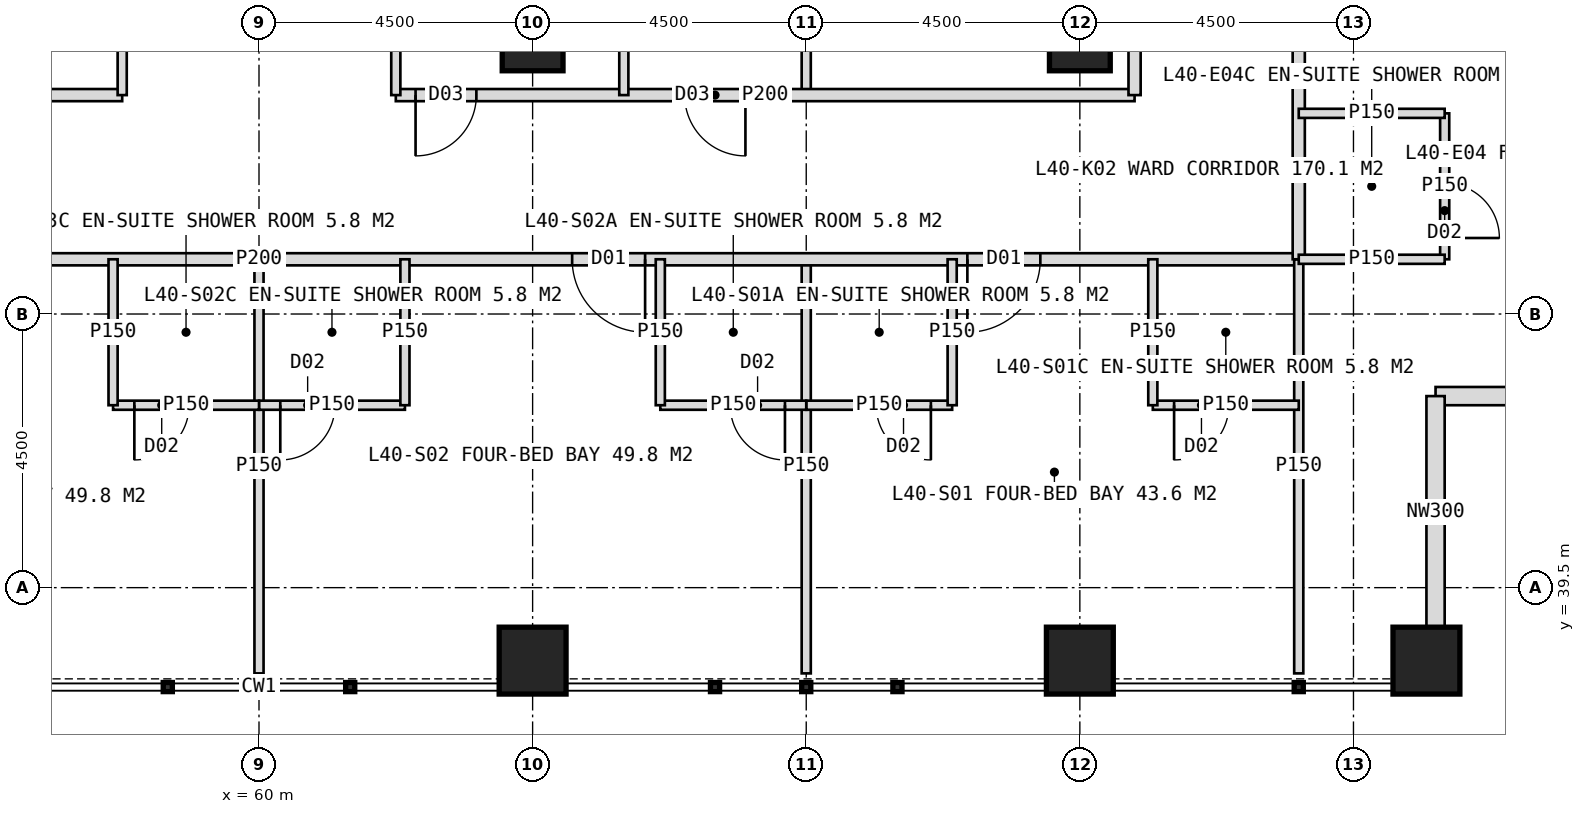
"""IFC4 building model, lengths in metres.
Left out: names, types, materials, properties, quantities, classifications, styles, units other than length and angle.
Written with IfcOpenShell. Run it as: python <this file> out.ifc"""

import sys

from ifc_helpers import new_model, si_unit, direction, frame, frame_2d, origin, origin_2d, place, context, subcontext, project, spatial, rectangle, hollow_rectangle, extrude, element, fill, save


model = new_model("IFC4")
c1 = context("Model", 3, precision=1e-05, world=origin(), true_north=direction((0.0, 1.0)))
c2 = subcontext(c1, "Body", "Model", "MODEL_VIEW")
j1 = project(units=[si_unit("LENGTHUNIT", "METRE"), si_unit("PLANEANGLEUNIT", "RADIAN")], contexts=[c1])
p1 = place(None, origin())
s1 = spatial("IfcSite", under=j1, at=p1, CompositionType="ELEMENT")
p2 = place(p1, origin())
s2 = spatial("IfcBuilding", under=s1, at=p2, CompositionType="ELEMENT")
p3 = place(p2, frame((0.0, 0.0, 168.0)))
s3 = spatial("IfcBuildingStorey", under=s2, at=p3, CompositionType="ELEMENT", Elevation=168.0)
for number, where, z_axis, x_axis in (
    (1, (73.5, 48.5, 0.0), (0.0, 0.0, 1.0), (1.0, 0.0, 0.0)),
    (2, (64.5, 48.5, 0.0), (0.0, 0.0, 1.0), (1.0, 0.0, 0.0)),
):
    element("IfcColumn", number, at=place(p3, frame(where, z_axis=z_axis, x_axis=x_axis)), inside=s3, PredefinedType="COLUMN", context=c2, shape_type="SweptSolid", body=[
        extrude(hollow_rectangle(XDim=1.0, YDim=1.0, WallThickness=0.1, at=origin_2d()), origin(), (0.0, 0.0, 1.0), 4.0),
    ])
for number, where, z_axis, x_axis in (
    (3, (64.5, 38.3, 0.0), (0.0, 0.0, 1.0), (1.0, 0.0, 0.0)),
    (4, (73.5, 38.3, 0.0), (0.0, 0.0, 1.0), (1.0, 0.0, 0.0)),
    (5, (79.2, 38.3, 0.0), (0.0, 0.0, 1.0), (1.0, 0.0, 0.0)),
):
    element("IfcColumn", number, at=place(p3, frame(where, z_axis=z_axis, x_axis=x_axis)), inside=s3, PredefinedType="COLUMN", context=c2, shape_type="SweptSolid", body=[
        extrude(hollow_rectangle(XDim=1.1, YDim=1.1, WallThickness=0.1, at=origin_2d()), origin(), (0.0, 0.0, 1.0), 4.0),
    ])
for number, where, z_axis, x_axis in (
    (6, (83.15, 42.65, 0.0), (0.0, 0.0, 1.0), (-1.0, 0.0, 0.0)),
    (7, (79.35, 42.65, 0.0), (0.0, 0.0, 1.0), (0.0, -1.0, 0.0)),
):
    element("IfcWall", number, at=place(p3, frame(where, z_axis=z_axis, x_axis=x_axis)), inside=s3, PredefinedType="ELEMENTEDWALL", context=c2, shape_type="SweptSolid", body=[
        extrude(rectangle(XDim=3.8, YDim=0.3, at=frame_2d((1.9, 0.0))), origin(), (0.0, 0.0, 1.0), 4.0),
    ])
p4 = place(p3, frame((69.0, 44.9, 0.0), z_axis=(0.0, 0.0, 1.0), x_axis=(0.0, -1.0, 0.0)))
e8 = element("IfcWall", 8, at=p4, inside=s3, PredefinedType="PARTITIONING", context=c2, shape_type="SweptSolid", body=[
    extrude(rectangle(XDim=6.81, YDim=0.15, at=frame_2d((3.405, 0.0))), origin(), (0.0, 0.0, 1.0), 3.75),
])
p5 = place(p3, frame((60.0, 44.9, 0.0), z_axis=(0.0, 0.0, 1.0), x_axis=(0.0, -1.0, 0.0)))
e9 = element("IfcWall", 9, at=p5, inside=s3, PredefinedType="PARTITIONING", context=c2, shape_type="SweptSolid", body=[
    extrude(rectangle(XDim=6.81, YDim=0.15, at=frame_2d((3.405, 0.0))), origin(), (0.0, 0.0, 1.0), 2.95),
])
p6 = place(p3, frame((77.1, 44.9, 0.0), z_axis=(0.0, 0.0, 1.0), x_axis=(-1.0, 0.0, 0.0)))
e10 = element("IfcWall", 10, at=p6, inside=s3, PredefinedType="PARTITIONING", context=c2, shape_type="SweptSolid", body=[
    extrude(rectangle(XDim=34.2, YDim=0.2, at=frame_2d((17.1, 0.0))), origin(), (0.0, 0.0, 1.0), 3.75),
])
p7 = place(p6, frame((4.25, 0.0, 0.0)))
e11 = element("IfcOpeningElement", 11, at=p7, cuts=e10, PredefinedType="OPENING", context=c2, shape_type="SweptSolid", body=[
    extrude(rectangle(XDim=1.2, YDim=2.2, at=frame_2d((0.6, 1.1))), frame((0.0, 0.11, 0.0), z_axis=(0.0, -1.0, 0.0), x_axis=(1.0, 0.0, 0.0)), (0.0, 0.0, 1.0), 0.22),
])
p8 = place(p6, frame((10.75, 0.0, 0.0)))
e12 = element("IfcOpeningElement", 12, at=p8, cuts=e10, PredefinedType="OPENING", context=c2, shape_type="SweptSolid", body=[
    extrude(rectangle(XDim=1.2, YDim=2.2, at=frame_2d((0.6, 1.1))), frame((0.0, 0.11, 0.0), z_axis=(0.0, -1.0, 0.0), x_axis=(1.0, 0.0, 0.0)), (0.0, 0.0, 1.0), 0.22),
])
p9 = place(p6, frame((22.25, 0.0, 0.0)))
e13 = element("IfcOpeningElement", 13, at=p9, cuts=e10, PredefinedType="OPENING", context=c2, shape_type="SweptSolid", body=[
    extrude(rectangle(XDim=1.2, YDim=2.2, at=frame_2d((0.6, 1.1))), frame((0.0, 0.11, 0.0), z_axis=(0.0, -1.0, 0.0), x_axis=(1.0, 0.0, 0.0)), (0.0, 0.0, 1.0), 0.22),
])
p10 = place(p6, frame((28.75, 0.0, 0.0)))
e14 = element("IfcOpeningElement", 14, at=p10, cuts=e10, PredefinedType="OPENING", context=c2, shape_type="SweptSolid", body=[
    extrude(rectangle(XDim=1.2, YDim=2.2, at=frame_2d((0.6, 1.1))), frame((0.0, 0.11, 0.0), z_axis=(0.0, -1.0, 0.0), x_axis=(1.0, 0.0, 0.0)), (0.0, 0.0, 1.0), 0.22),
])
p11 = place(p3, frame((77.1, 44.9, 0.0), z_axis=(0.0, 0.0, 1.0), x_axis=(0.0, -1.0, 0.0)))
e15 = element("IfcWall", 15, at=p11, inside=s3, PredefinedType="PARTITIONING", context=c2, shape_type="SweptSolid", body=[
    extrude(rectangle(XDim=6.81, YDim=0.15, at=frame_2d((3.405, 0.0))), origin(), (0.0, 0.0, 1.0), 3.75),
])
p12 = place(p3, frame((71.4, 42.5, 0.0), z_axis=(0.0, 0.0, 1.0), x_axis=(-1.0, 0.0, 0.0)))
e16 = element("IfcWall", 16, at=p12, inside=s3, PredefinedType="PARTITIONING", context=c2, shape_type="SweptSolid", body=[
    extrude(rectangle(XDim=2.4, YDim=0.15, at=frame_2d((1.2, 0.0))), origin(), (0.0, 0.0, 1.0), 3.75),
])
p13 = place(p12, frame((0.35, 0.0, 0.0)))
e17 = element("IfcOpeningElement", 17, at=p13, cuts=e16, PredefinedType="OPENING", context=c2, shape_type="SweptSolid", body=[
    extrude(rectangle(XDim=0.9, YDim=2.1, at=frame_2d((0.45, 1.05))), frame((0.0, 0.085, 0.0), z_axis=(0.0, -1.0, 0.0), x_axis=(1.0, 0.0, 0.0)), (0.0, 0.0, 1.0), 0.17),
])
p14 = place(p3, frame((71.4, 44.9, 0.0), z_axis=(0.0, 0.0, 1.0), x_axis=(0.0, -1.0, 0.0)))
e18 = element("IfcWall", 18, at=p14, inside=s3, PredefinedType="PARTITIONING", context=c2, shape_type="SweptSolid", body=[
    extrude(rectangle(XDim=2.4, YDim=0.15, at=frame_2d((1.2, 0.0))), origin(), (0.0, 0.0, 1.0), 3.75),
])
p15 = place(p3, frame((77.1, 42.5, 0.0), z_axis=(0.0, 0.0, 1.0), x_axis=(-1.0, 0.0, 0.0)))
e19 = element("IfcWall", 19, at=p15, inside=s3, PredefinedType="PARTITIONING", context=c2, shape_type="SweptSolid", body=[
    extrude(rectangle(XDim=2.4, YDim=0.15, at=frame_2d((1.2, 0.0))), origin(), (0.0, 0.0, 1.0), 3.75),
])
p16 = place(p15, frame((1.15, 0.0, 0.0)))
e20 = element("IfcOpeningElement", 20, at=p16, cuts=e19, PredefinedType="OPENING", context=c2, shape_type="SweptSolid", body=[
    extrude(rectangle(XDim=0.9, YDim=2.1, at=frame_2d((0.45, 1.05))), frame((0.0, 0.085, 0.0), z_axis=(0.0, -1.0, 0.0), x_axis=(1.0, 0.0, 0.0)), (0.0, 0.0, 1.0), 0.17),
])
p17 = place(p3, frame((74.7, 44.9, 0.0), z_axis=(0.0, 0.0, 1.0), x_axis=(0.0, -1.0, 0.0)))
e21 = element("IfcWall", 21, at=p17, inside=s3, PredefinedType="PARTITIONING", context=c2, shape_type="SweptSolid", body=[
    extrude(rectangle(XDim=2.4, YDim=0.15, at=frame_2d((1.2, 0.0))), origin(), (0.0, 0.0, 1.0), 3.75),
])
p18 = place(p3, frame((69.0, 42.5, 0.0), z_axis=(0.0, 0.0, 1.0), x_axis=(-1.0, 0.0, 0.0)))
e22 = element("IfcWall", 22, at=p18, inside=s3, PredefinedType="PARTITIONING", context=c2, shape_type="SweptSolid", body=[
    extrude(rectangle(XDim=2.4, YDim=0.15, at=frame_2d((1.2, 0.0))), origin(), (0.0, 0.0, 1.0), 3.75),
])
p19 = place(p18, frame((0.35, 0.0, 0.0)))
e23 = element("IfcOpeningElement", 23, at=p19, cuts=e22, PredefinedType="OPENING", context=c2, shape_type="SweptSolid", body=[
    extrude(rectangle(XDim=0.9, YDim=2.1, at=frame_2d((0.45, 1.05))), frame((0.0, 0.085, 0.0), z_axis=(0.0, -1.0, 0.0), x_axis=(1.0, 0.0, 0.0)), (0.0, 0.0, 1.0), 0.17),
])
p20 = place(p3, frame((66.6, 44.9, 0.0), z_axis=(0.0, 0.0, 1.0), x_axis=(0.0, -1.0, 0.0)))
e24 = element("IfcWall", 24, at=p20, inside=s3, PredefinedType="PARTITIONING", context=c2, shape_type="SweptSolid", body=[
    extrude(rectangle(XDim=2.4, YDim=0.15, at=frame_2d((1.2, 0.0))), origin(), (0.0, 0.0, 1.0), 3.75),
])
p21 = place(p3, frame((62.4, 42.5, 0.0), z_axis=(0.0, 0.0, 1.0), x_axis=(-1.0, 0.0, 0.0)))
e25 = element("IfcWall", 25, at=p21, inside=s3, PredefinedType="PARTITIONING", context=c2, shape_type="SweptSolid", body=[
    extrude(rectangle(XDim=2.4, YDim=0.15, at=frame_2d((1.2, 0.0))), origin(), (0.0, 0.0, 1.0), 3.75),
])
p22 = place(p21, frame((1.15, 0.0, 0.0)))
e26 = element("IfcOpeningElement", 26, at=p22, cuts=e25, PredefinedType="OPENING", context=c2, shape_type="SweptSolid", body=[
    extrude(rectangle(XDim=0.9, YDim=2.1, at=frame_2d((0.45, 1.05))), frame((0.0, 0.085, 0.0), z_axis=(0.0, -1.0, 0.0), x_axis=(1.0, 0.0, 0.0)), (0.0, 0.0, 1.0), 0.17),
])
p23 = place(p3, frame((62.4, 44.9, 0.0), z_axis=(0.0, 0.0, 1.0), x_axis=(0.0, -1.0, 0.0)))
e27 = element("IfcWall", 27, at=p23, inside=s3, PredefinedType="PARTITIONING", context=c2, shape_type="SweptSolid", body=[
    extrude(rectangle(XDim=2.4, YDim=0.15, at=frame_2d((1.2, 0.0))), origin(), (0.0, 0.0, 1.0), 3.75),
])
p24 = place(p3, frame((60.0, 42.5, 0.0), z_axis=(0.0, 0.0, 1.0), x_axis=(-1.0, 0.0, 0.0)))
e28 = element("IfcWall", 28, at=p24, inside=s3, PredefinedType="PARTITIONING", context=c2, shape_type="SweptSolid", body=[
    extrude(rectangle(XDim=2.4, YDim=0.15, at=frame_2d((1.2, 0.0))), origin(), (0.0, 0.0, 1.0), 3.75),
])
p25 = place(p24, frame((1.15, 0.0, 0.0)))
e29 = element("IfcOpeningElement", 29, at=p25, cuts=e28, PredefinedType="OPENING", context=c2, shape_type="SweptSolid", body=[
    extrude(rectangle(XDim=0.9, YDim=2.1, at=frame_2d((0.45, 1.05))), frame((0.0, 0.085, 0.0), z_axis=(0.0, -1.0, 0.0), x_axis=(1.0, 0.0, 0.0)), (0.0, 0.0, 1.0), 0.17),
])
p26 = place(p3, frame((57.6, 44.9, 0.0), z_axis=(0.0, 0.0, 1.0), x_axis=(0.0, -1.0, 0.0)))
e30 = element("IfcWall", 30, at=p26, inside=s3, PredefinedType="PARTITIONING", context=c2, shape_type="SweptSolid", body=[
    extrude(rectangle(XDim=2.4, YDim=0.15, at=frame_2d((1.2, 0.0))), origin(), (0.0, 0.0, 1.0), 3.75),
])
p27 = place(p3, frame((69.0, 53.0, 0.0), z_axis=(0.0, 0.0, 1.0), x_axis=(0.0, -1.0, 0.0)))
e31 = element("IfcWall", 31, at=p27, inside=s3, PredefinedType="PARTITIONING", context=c2, shape_type="SweptSolid", body=[
    extrude(rectangle(XDim=5.4, YDim=0.15, at=frame_2d((2.7, 0.0))), origin(), (0.0, 0.0, 1.0), 3.75),
])
p28 = place(p3, frame((74.4, 47.6, 0.0), z_axis=(0.0, 0.0, 1.0), x_axis=(-1.0, 0.0, 0.0)))
e32 = element("IfcWall", 32, at=p28, inside=s3, PredefinedType="PARTITIONING", context=c2, shape_type="SweptSolid", body=[
    extrude(rectangle(XDim=12.15, YDim=0.2, at=frame_2d((6.075, 0.0))), origin(), (0.0, 0.0, 1.0), 3.75),
])
p29 = place(p28, frame((6.4, 0.0, 0.0)))
e33 = element("IfcOpeningElement", 33, at=p29, cuts=e32, PredefinedType="OPENING", context=c2, shape_type="SweptSolid", body=[
    extrude(rectangle(XDim=1.0, YDim=2.1, at=frame_2d((0.5, 1.05))), frame((0.0, 0.11, 0.0), z_axis=(0.0, -1.0, 0.0), x_axis=(1.0, 0.0, 0.0)), (0.0, 0.0, 1.0), 0.22),
])
p30 = place(p28, frame((10.825, 0.0, 0.0)))
e34 = element("IfcOpeningElement", 34, at=p30, cuts=e32, PredefinedType="OPENING", context=c2, shape_type="SweptSolid", body=[
    extrude(rectangle(XDim=1.0, YDim=2.1, at=frame_2d((0.5, 1.05))), frame((0.0, 0.11, 0.0), z_axis=(0.0, -1.0, 0.0), x_axis=(1.0, 0.0, 0.0)), (0.0, 0.0, 1.0), 0.22),
])
p31 = place(p3, frame((57.75, 47.6, 0.0), z_axis=(0.0, 0.0, 1.0), x_axis=(-1.0, 0.0, 0.0)))
e35 = element("IfcWall", 35, at=p31, inside=s3, PredefinedType="PARTITIONING", context=c2, shape_type="SweptSolid", body=[
    extrude(rectangle(XDim=12.15, YDim=0.2, at=frame_2d((6.075, 0.0))), origin(), (0.0, 0.0, 1.0), 3.75),
])
p32 = place(p31, frame((4.3, 0.0, 0.0)))
e36 = element("IfcOpeningElement", 36, at=p32, cuts=e35, PredefinedType="OPENING", context=c2, shape_type="SweptSolid", body=[
    extrude(rectangle(XDim=1.0, YDim=2.1, at=frame_2d((0.5, 1.05))), frame((0.0, 0.11, 0.0), z_axis=(0.0, -1.0, 0.0), x_axis=(1.0, 0.0, 0.0)), (0.0, 0.0, 1.0), 0.22),
])
p33 = place(p31, frame((8.95, 0.0, 0.0)))
e37 = element("IfcOpeningElement", 37, at=p33, cuts=e35, PredefinedType="OPENING", context=c2, shape_type="SweptSolid", body=[
    extrude(rectangle(XDim=1.0, YDim=2.1, at=frame_2d((0.5, 1.05))), frame((0.0, 0.11, 0.0), z_axis=(0.0, -1.0, 0.0), x_axis=(1.0, 0.0, 0.0)), (0.0, 0.0, 1.0), 0.22),
])
for number, where, z_axis, x_axis in (
    (38, (62.25, 53.0, 0.0), (0.0, 0.0, 1.0), (0.0, -1.0, 0.0)),
    (39, (57.75, 53.0, 0.0), (0.0, 0.0, 1.0), (0.0, -1.0, 0.0)),
    (40, (66.0, 53.0, 0.0), (0.0, 0.0, 1.0), (0.0, -1.0, 0.0)),
):
    element("IfcWall", number, at=place(p3, frame(where, z_axis=z_axis, x_axis=x_axis)), inside=s3, PredefinedType="PARTITIONING", context=c2, shape_type="SweptSolid", body=[
        extrude(rectangle(XDim=5.4, YDim=0.15, at=frame_2d((2.7, 0.0))), origin(), (0.0, 0.0, 1.0), 3.75),
    ])
p34 = place(p3, frame((77.1, 79.1, 0.0), z_axis=(0.0, 0.0, 1.0), x_axis=(0.0, -1.0, 0.0)))
e41 = element("IfcWall", 41, at=p34, inside=s3, PredefinedType="PARTITIONING", context=c2, shape_type="SweptSolid", body=[
    extrude(rectangle(XDim=34.2, YDim=0.2, at=frame_2d((17.1, 0.0))), origin(), (0.0, 0.0, 1.0), 3.75),
])
p35 = place(p34, frame((3.65, 0.0, 0.0)))
e42 = element("IfcOpeningElement", 42, at=p35, cuts=e41, PredefinedType="OPENING", context=c2, shape_type="SweptSolid", body=[
    extrude(rectangle(XDim=1.2, YDim=2.2, at=frame_2d((0.6, 1.1))), frame((0.0, 0.11, 0.0), z_axis=(0.0, -1.0, 0.0), x_axis=(1.0, 0.0, 0.0)), (0.0, 0.0, 1.0), 0.22),
])
p36 = place(p34, frame((10.75, 0.0, 0.0)))
e43 = element("IfcOpeningElement", 43, at=p36, cuts=e41, PredefinedType="OPENING", context=c2, shape_type="SweptSolid", body=[
    extrude(rectangle(XDim=1.2, YDim=2.2, at=frame_2d((0.6, 1.1))), frame((0.0, 0.11, 0.0), z_axis=(0.0, -1.0, 0.0), x_axis=(1.0, 0.0, 0.0)), (0.0, 0.0, 1.0), 0.22),
])
p37 = place(p34, frame((22.25, 0.0, 0.0)))
e44 = element("IfcOpeningElement", 44, at=p37, cuts=e41, PredefinedType="OPENING", context=c2, shape_type="SweptSolid", body=[
    extrude(rectangle(XDim=1.2, YDim=2.2, at=frame_2d((0.6, 1.1))), frame((0.0, 0.11, 0.0), z_axis=(0.0, -1.0, 0.0), x_axis=(1.0, 0.0, 0.0)), (0.0, 0.0, 1.0), 0.22),
])
p38 = place(p34, frame((28.75, 0.0, 0.0)))
e45 = element("IfcOpeningElement", 45, at=p38, cuts=e41, PredefinedType="OPENING", context=c2, shape_type="SweptSolid", body=[
    extrude(rectangle(XDim=1.2, YDim=2.2, at=frame_2d((0.6, 1.1))), frame((0.0, 0.11, 0.0), z_axis=(0.0, -1.0, 0.0), x_axis=(1.0, 0.0, 0.0)), (0.0, 0.0, 1.0), 0.22),
])
p39 = place(p3, frame((79.5, 47.3, 0.0), z_axis=(0.0, 0.0, 1.0), x_axis=(0.0, -1.0, 0.0)))
e46 = element("IfcWall", 46, at=p39, inside=s3, PredefinedType="PARTITIONING", context=c2, shape_type="SweptSolid", body=[
    extrude(rectangle(XDim=2.4, YDim=0.15, at=frame_2d((1.2, 0.0))), origin(), (0.0, 0.0, 1.0), 3.75),
])
p40 = place(p39, frame((1.15, 0.0, 0.0)))
e47 = element("IfcOpeningElement", 47, at=p40, cuts=e46, PredefinedType="OPENING", context=c2, shape_type="SweptSolid", body=[
    extrude(rectangle(XDim=0.9, YDim=2.1, at=frame_2d((0.45, 1.05))), frame((0.0, 0.085, 0.0), z_axis=(0.0, -1.0, 0.0), x_axis=(1.0, 0.0, 0.0)), (0.0, 0.0, 1.0), 0.17),
])
for number, where, z_axis, x_axis in (
    (48, (77.1, 47.3, 0.0), (0.0, 0.0, 1.0), (1.0, 0.0, 0.0)),
    (49, (77.1, 44.9, 0.0), (0.0, 0.0, 1.0), (1.0, 0.0, 0.0)),
):
    element("IfcWall", number, at=place(p3, frame(where, z_axis=z_axis, x_axis=x_axis)), inside=s3, PredefinedType="PARTITIONING", context=c2, shape_type="SweptSolid", body=[
        extrude(rectangle(XDim=2.4, YDim=0.15, at=frame_2d((1.2, 0.0))), origin(), (0.0, 0.0, 1.0), 3.75),
    ])
p41 = place(p3, frame((74.4, 62.0, 0.0), z_axis=(0.0, 0.0, 1.0), x_axis=(0.0, -1.0, 0.0)))
e50 = element("IfcWall", 50, at=p41, inside=s3, PredefinedType="PARTITIONING", context=c2, shape_type="SweptSolid", body=[
    extrude(rectangle(XDim=14.4, YDim=0.2, at=frame_2d((7.2, 0.0))), origin(), (0.0, 0.0, 1.0), 3.75),
])
p42 = place(p41, frame((1.45, 0.0, 0.0)))
e51 = element("IfcOpeningElement", 51, at=p42, cuts=e50, PredefinedType="OPENING", context=c2, shape_type="SweptSolid", body=[
    extrude(rectangle(XDim=1.0, YDim=2.1, at=frame_2d((0.5, 1.05))), frame((0.0, 0.11, 0.0), z_axis=(0.0, -1.0, 0.0), x_axis=(1.0, 0.0, 0.0)), (0.0, 0.0, 1.0), 0.22),
])
p43 = place(p41, frame((11.2, 0.0, 0.0)))
e52 = element("IfcOpeningElement", 52, at=p43, cuts=e50, PredefinedType="OPENING", context=c2, shape_type="SweptSolid", body=[
    extrude(rectangle(XDim=1.0, YDim=2.1, at=frame_2d((0.5, 1.05))), frame((0.0, 0.11, 0.0), z_axis=(0.0, -1.0, 0.0), x_axis=(1.0, 0.0, 0.0)), (0.0, 0.0, 1.0), 0.22),
])
p44 = place(p7, origin())
e53 = element("IfcDoor", 53, at=p44, inside=s3, OperationType="SINGLE_SWING_RIGHT", PredefinedType="DOOR", context=c2, shape_type="SweptSolid", body=[
    extrude(rectangle(XDim=1.2, YDim=2.2, at=frame_2d((0.6, 1.1))), frame((0.0, 0.025, 0.0), z_axis=(0.0, -1.0, 0.0), x_axis=(1.0, 0.0, 0.0)), (0.0, 0.0, 1.0), 0.05),
])
fill(e11, e53)
p45 = place(p13, origin())
e54 = element("IfcDoor", 54, at=p45, inside=s3, OperationType="SINGLE_SWING_LEFT", PredefinedType="DOOR", context=c2, shape_type="SweptSolid", body=[
    extrude(rectangle(XDim=0.9, YDim=2.1, at=frame_2d((0.45, 1.05))), frame((0.0, 0.025, 0.0), z_axis=(0.0, -1.0, 0.0), x_axis=(1.0, 0.0, 0.0)), (0.0, 0.0, 1.0), 0.05),
])
fill(e17, e54)
p46 = place(p16, origin())
e55 = element("IfcDoor", 55, at=p46, inside=s3, OperationType="SINGLE_SWING_RIGHT", PredefinedType="DOOR", context=c2, shape_type="SweptSolid", body=[
    extrude(rectangle(XDim=0.9, YDim=2.1, at=frame_2d((0.45, 1.05))), frame((0.0, 0.025, 0.0), z_axis=(0.0, -1.0, 0.0), x_axis=(1.0, 0.0, 0.0)), (0.0, 0.0, 1.0), 0.05),
])
fill(e20, e55)
p47 = place(p8, origin())
e56 = element("IfcDoor", 56, at=p47, inside=s3, OperationType="SINGLE_SWING_LEFT", PredefinedType="DOOR", context=c2, shape_type="SweptSolid", body=[
    extrude(rectangle(XDim=1.2, YDim=2.2, at=frame_2d((0.6, 1.1))), frame((0.0, 0.025, 0.0), z_axis=(0.0, -1.0, 0.0), x_axis=(1.0, 0.0, 0.0)), (0.0, 0.0, 1.0), 0.05),
])
fill(e12, e56)
p48 = place(p19, origin())
e57 = element("IfcDoor", 57, at=p48, inside=s3, OperationType="SINGLE_SWING_LEFT", PredefinedType="DOOR", context=c2, shape_type="SweptSolid", body=[
    extrude(rectangle(XDim=0.9, YDim=2.1, at=frame_2d((0.45, 1.05))), frame((0.0, 0.025, 0.0), z_axis=(0.0, -1.0, 0.0), x_axis=(1.0, 0.0, 0.0)), (0.0, 0.0, 1.0), 0.05),
])
fill(e23, e57)
p49 = place(p22, origin())
e58 = element("IfcDoor", 58, at=p49, inside=s3, OperationType="SINGLE_SWING_RIGHT", PredefinedType="DOOR", context=c2, shape_type="SweptSolid", body=[
    extrude(rectangle(XDim=0.9, YDim=2.1, at=frame_2d((0.45, 1.05))), frame((0.0, 0.025, 0.0), z_axis=(0.0, -1.0, 0.0), x_axis=(1.0, 0.0, 0.0)), (0.0, 0.0, 1.0), 0.05),
])
fill(e26, e58)
p50 = place(p25, origin())
e59 = element("IfcDoor", 59, at=p50, inside=s3, OperationType="SINGLE_SWING_RIGHT", PredefinedType="DOOR", context=c2, shape_type="SweptSolid", body=[
    extrude(rectangle(XDim=0.9, YDim=2.1, at=frame_2d((0.45, 1.05))), frame((0.0, 0.025, 0.0), z_axis=(0.0, -1.0, 0.0), x_axis=(1.0, 0.0, 0.0)), (0.0, 0.0, 1.0), 0.05),
])
fill(e29, e59)
p51 = place(p29, origin())
e60 = element("IfcDoor", 60, at=p51, inside=s3, OperationType="SINGLE_SWING_LEFT", PredefinedType="DOOR", context=c2, shape_type="SweptSolid", body=[
    extrude(rectangle(XDim=1.0, YDim=2.1, at=frame_2d((0.5, 1.05))), frame((0.0, 0.025, 0.0), z_axis=(0.0, -1.0, 0.0), x_axis=(1.0, 0.0, 0.0)), (0.0, 0.0, 1.0), 0.05),
])
fill(e33, e60)
p52 = place(p30, origin())
e61 = element("IfcDoor", 61, at=p52, inside=s3, OperationType="SINGLE_SWING_RIGHT", PredefinedType="DOOR", context=c2, shape_type="SweptSolid", body=[
    extrude(rectangle(XDim=1.0, YDim=2.1, at=frame_2d((0.5, 1.05))), frame((0.0, 0.025, 0.0), z_axis=(0.0, -1.0, 0.0), x_axis=(1.0, 0.0, 0.0)), (0.0, 0.0, 1.0), 0.05),
])
fill(e34, e61)
p53 = place(p40, origin())
e62 = element("IfcDoor", 62, at=p53, inside=s3, OperationType="SINGLE_SWING_RIGHT", PredefinedType="DOOR", context=c2, shape_type="SweptSolid", body=[
    extrude(rectangle(XDim=0.9, YDim=2.1, at=frame_2d((0.45, 1.05))), frame((0.0, 0.025, 0.0), z_axis=(0.0, -1.0, 0.0), x_axis=(1.0, 0.0, 0.0)), (0.0, 0.0, 1.0), 0.05),
])
fill(e47, e62)
save(model, sys.argv[1])
